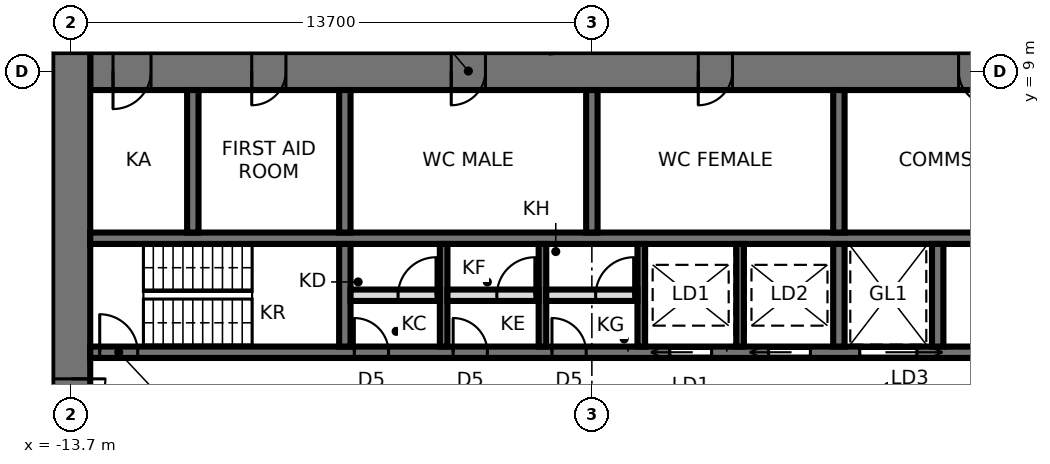
"""IFC4 building model, lengths in metres.
Left out: names, types, materials, properties, quantities, classifications, styles, units other than length and angle.
Written with IfcOpenShell. Run it as: python <this file> out.ifc"""

import sys

from ifc_helpers import new_model, si_unit, direction, frame, frame_2d, origin, place, context, subcontext, project, spatial, rectangle, extrude, element, fill, save


model = new_model("IFC4")
c1 = context("Model", 3, precision=1e-05, world=origin(), true_north=direction((0.0, 1.0)))
c2 = subcontext(c1, "Body", "Model", "MODEL_VIEW")
j1 = project(units=[si_unit("LENGTHUNIT", "METRE"), si_unit("PLANEANGLEUNIT", "RADIAN")], contexts=[c1])
p1 = place(None, origin())
s1 = spatial("IfcSite", under=j1, at=p1, CompositionType="ELEMENT")
p2 = place(p1, origin())
s2 = spatial("IfcBuilding", under=s1, at=p2, CompositionType="ELEMENT")
p3 = place(p2, frame((0.0, 0.0, 251.8)))
s3 = spatial("IfcBuildingStorey", under=s2, at=p3, CompositionType="ELEMENT", Elevation=251.8)
p4 = place(p3, frame((13.2, 9.0, 0.0), z_axis=(0.0, 0.0, 1.0), x_axis=(-1.0, 0.0, 0.0)))
e1 = element("IfcWall", 1, at=p4, inside=s3, PredefinedType="SHEAR", context=c2, shape_type="SweptSolid", body=[
    extrude(rectangle(XDim=26.4, YDim=1.0, at=frame_2d((13.2, 0.0))), origin(), (0.0, 0.0, 1.0), 4.2),
])
p5 = place(p4, frame((2.65, 0.0, 0.0)))
e2 = element("IfcOpeningElement", 2, at=p5, cuts=e1, PredefinedType="OPENING", context=c2, shape_type="SweptSolid", body=[
    extrude(rectangle(XDim=0.9, YDim=2.1, at=frame_2d((0.45, 1.05))), frame((0.0, 0.51, 0.0), z_axis=(0.0, -1.0, 0.0), x_axis=(1.0, 0.0, 0.0)), (0.0, 0.0, 1.0), 1.02),
])
p6 = place(p4, frame((9.5, 0.0, 0.0)))
e3 = element("IfcOpeningElement", 3, at=p6, cuts=e1, PredefinedType="OPENING", context=c2, shape_type="SweptSolid", body=[
    extrude(rectangle(XDim=0.9, YDim=2.1, at=frame_2d((0.45, 1.05))), frame((0.0, 0.51, 0.0), z_axis=(0.0, -1.0, 0.0), x_axis=(1.0, 0.0, 0.0)), (0.0, 0.0, 1.0), 1.02),
])
p7 = place(p4, frame((16.0, 0.0, 0.0)))
e4 = element("IfcOpeningElement", 4, at=p7, cuts=e1, PredefinedType="OPENING", context=c2, shape_type="SweptSolid", body=[
    extrude(rectangle(XDim=0.9, YDim=2.1, at=frame_2d((0.45, 1.05))), frame((0.0, 0.51, 0.0), z_axis=(0.0, -1.0, 0.0), x_axis=(1.0, 0.0, 0.0)), (0.0, 0.0, 1.0), 1.02),
])
p8 = place(p4, frame((21.25, 0.0, 0.0)))
e5 = element("IfcOpeningElement", 5, at=p8, cuts=e1, PredefinedType="OPENING", context=c2, shape_type="SweptSolid", body=[
    extrude(rectangle(XDim=0.9, YDim=2.1, at=frame_2d((0.45, 1.05))), frame((0.0, 0.51, 0.0), z_axis=(0.0, -1.0, 0.0), x_axis=(1.0, 0.0, 0.0)), (0.0, 0.0, 1.0), 1.02),
])
p9 = place(p4, frame((24.8, 0.0, 0.0)))
e6 = element("IfcOpeningElement", 6, at=p9, cuts=e1, PredefinedType="OPENING", context=c2, shape_type="SweptSolid", body=[
    extrude(rectangle(XDim=1.0, YDim=2.1, at=frame_2d((0.5, 1.05))), frame((0.0, 0.51, 0.0), z_axis=(0.0, -1.0, 0.0), x_axis=(1.0, 0.0, 0.0)), (0.0, 0.0, 1.0), 1.02),
])
p10 = place(p3, frame((-13.7, 9.5, 0.0), z_axis=(0.0, 0.0, 1.0), x_axis=(0.0, -1.0, 0.0)))
e7 = element("IfcWall", 7, at=p10, inside=s3, PredefinedType="SHEAR", context=c2, shape_type="SweptSolid", body=[
    extrude(rectangle(XDim=19.0, YDim=1.0, at=frame_2d((9.5, 0.0))), origin(), (0.0, 0.0, 1.0), 4.2),
])
p11 = place(p10, frame((8.6, 0.0, 0.0)))
e8 = element("IfcOpeningElement", 8, at=p11, cuts=e7, PredefinedType="OPENING", context=c2, shape_type="SweptSolid", body=[
    extrude(rectangle(XDim=1.8, YDim=2.4, at=frame_2d((0.9, 1.2))), frame((0.0, 0.51, 0.0), z_axis=(0.0, -1.0, 0.0), x_axis=(1.0, 0.0, 0.0)), (0.0, 0.0, 1.0), 1.02),
])
p12 = place(p3, frame((-13.2, 1.6, 0.0), z_axis=(0.0, 0.0, 1.0), x_axis=(1.0, 0.0, 0.0)))
e9 = element("IfcWall", 9, at=p12, inside=s3, PredefinedType="SHEAR", context=c2, shape_type="SweptSolid", body=[
    extrude(rectangle(XDim=26.4, YDim=0.3, at=frame_2d((13.2, 0.0))), origin(), (0.0, 0.0, 1.0), 4.2),
])
p13 = place(p12, frame((0.25, 0.0, 0.0)))
e10 = element("IfcOpeningElement", 10, at=p13, cuts=e9, PredefinedType="OPENING", context=c2, shape_type="SweptSolid", body=[
    extrude(rectangle(XDim=1.0, YDim=2.1, at=frame_2d((0.5, 1.05))), frame((0.0, 0.16, 0.0), z_axis=(0.0, -1.0, 0.0), x_axis=(1.0, 0.0, 0.0)), (0.0, 0.0, 1.0), 0.32),
])
p14 = place(p12, frame((20.25, 0.0, 0.0)))
e11 = element("IfcOpeningElement", 11, at=p14, cuts=e9, PredefinedType="OPENING", context=c2, shape_type="SweptSolid", body=[
    extrude(rectangle(XDim=1.5, YDim=2.4, at=frame_2d((0.75, 1.2))), frame((0.0, 0.16, 0.0), z_axis=(0.0, -1.0, 0.0), x_axis=(1.0, 0.0, 0.0)), (0.0, 0.0, 1.0), 0.32),
])
p15 = place(p12, frame((6.95, 0.0, 0.0)))
e12 = element("IfcOpeningElement", 12, at=p15, cuts=e9, PredefinedType="OPENING", context=c2, shape_type="SweptSolid", body=[
    extrude(rectangle(XDim=0.9, YDim=2.1, at=frame_2d((0.45, 1.05))), frame((0.0, 0.16, 0.0), z_axis=(0.0, -1.0, 0.0), x_axis=(1.0, 0.0, 0.0)), (0.0, 0.0, 1.0), 0.32),
])
p16 = place(p12, frame((9.55, 0.0, 0.0)))
e13 = element("IfcOpeningElement", 13, at=p16, cuts=e9, PredefinedType="OPENING", context=c2, shape_type="SweptSolid", body=[
    extrude(rectangle(XDim=0.9, YDim=2.1, at=frame_2d((0.45, 1.05))), frame((0.0, 0.16, 0.0), z_axis=(0.0, -1.0, 0.0), x_axis=(1.0, 0.0, 0.0)), (0.0, 0.0, 1.0), 0.32),
])
p17 = place(p12, frame((12.15, 0.0, 0.0)))
e14 = element("IfcOpeningElement", 14, at=p17, cuts=e9, PredefinedType="OPENING", context=c2, shape_type="SweptSolid", body=[
    extrude(rectangle(XDim=0.9, YDim=2.1, at=frame_2d((0.45, 1.05))), frame((0.0, 0.16, 0.0), z_axis=(0.0, -1.0, 0.0), x_axis=(1.0, 0.0, 0.0)), (0.0, 0.0, 1.0), 0.32),
])
p18 = place(p12, frame((15.25, 0.0, 0.0)))
e15 = element("IfcOpeningElement", 15, at=p18, cuts=e9, PredefinedType="OPENING", context=c2, shape_type="SweptSolid", body=[
    extrude(rectangle(XDim=1.1, YDim=2.3, at=frame_2d((0.55, 1.15))), frame((0.0, 0.16, 0.0), z_axis=(0.0, -1.0, 0.0), x_axis=(1.0, 0.0, 0.0)), (0.0, 0.0, 1.0), 0.32),
])
p19 = place(p12, frame((17.85, 0.0, 0.0)))
e16 = element("IfcOpeningElement", 16, at=p19, cuts=e9, PredefinedType="OPENING", context=c2, shape_type="SweptSolid", body=[
    extrude(rectangle(XDim=1.1, YDim=2.3, at=frame_2d((0.55, 1.15))), frame((0.0, 0.16, 0.0), z_axis=(0.0, -1.0, 0.0), x_axis=(1.0, 0.0, 0.0)), (0.0, 0.0, 1.0), 0.32),
])
p20 = place(p12, frame((24.15, 0.0, 0.0)))
e17 = element("IfcOpeningElement", 17, at=p20, cuts=e9, PredefinedType="OPENING", context=c2, shape_type="SweptSolid", body=[
    extrude(rectangle(XDim=0.9, YDim=2.1, at=frame_2d((0.45, 1.05))), frame((0.0, 0.16, 0.0), z_axis=(0.0, -1.0, 0.0), x_axis=(1.0, 0.0, 0.0)), (0.0, 0.0, 1.0), 0.32),
])
p21 = place(p3, frame((-13.2, 4.6, 0.0), z_axis=(0.0, 0.0, 1.0), x_axis=(1.0, 0.0, 0.0)))
e18 = element("IfcWall", 18, at=p21, inside=s3, PredefinedType="SHEAR", context=c2, shape_type="SweptSolid", body=[
    extrude(rectangle(XDim=26.4, YDim=0.3, at=frame_2d((13.2, 0.0))), origin(), (0.0, 0.0, 1.0), 4.2),
])
p22 = place(p3, frame((-6.5, 1.75, 0.0), z_axis=(0.0, 0.0, 1.0), x_axis=(0.0, 1.0, 0.0)))
e19 = element("IfcWall", 19, at=p22, inside=s3, PredefinedType="SHEAR", context=c2, shape_type="SweptSolid", body=[
    extrude(rectangle(XDim=2.7, YDim=0.3, at=frame_2d((1.35, 0.0))), origin(), (0.0, 0.0, 1.0), 4.2),
])
p23 = place(p3, frame((-6.5, 4.75, 0.0), z_axis=(0.0, 0.0, 1.0), x_axis=(0.0, 1.0, 0.0)))
e20 = element("IfcWall", 20, at=p23, inside=s3, PredefinedType="SHEAR", context=c2, shape_type="SweptSolid", body=[
    extrude(rectangle(XDim=3.75, YDim=0.3, at=frame_2d((1.875, 0.0))), origin(), (0.0, 0.0, 1.0), 4.2),
])
p24 = place(p3, frame((6.5, 1.75, 0.0), z_axis=(0.0, 0.0, 1.0), x_axis=(0.0, 1.0, 0.0)))
e21 = element("IfcWall", 21, at=p24, inside=s3, PredefinedType="SHEAR", context=c2, shape_type="SweptSolid", body=[
    extrude(rectangle(XDim=2.7, YDim=0.3, at=frame_2d((1.35, 0.0))), origin(), (0.0, 0.0, 1.0), 4.2),
])
p25 = place(p3, frame((6.5, 4.75, 0.0), z_axis=(0.0, 0.0, 1.0), x_axis=(0.0, 1.0, 0.0)))
e22 = element("IfcWall", 22, at=p25, inside=s3, PredefinedType="SHEAR", context=c2, shape_type="SweptSolid", body=[
    extrude(rectangle(XDim=3.75, YDim=0.3, at=frame_2d((1.875, 0.0))), origin(), (0.0, 0.0, 1.0), 4.2),
])
for number, where, z_axis, x_axis in (
    (23, (-3.9, 1.75, 0.0), (0.0, 0.0, 1.0), (0.0, 1.0, 0.0)),
    (24, (-1.3, 1.75, 0.0), (0.0, 0.0, 1.0), (0.0, 1.0, 0.0)),
    (25, (1.3, 1.75, 0.0), (0.0, 0.0, 1.0), (0.0, 1.0, 0.0)),
    (26, (3.9, 1.75, 0.0), (0.0, 0.0, 1.0), (0.0, 1.0, 0.0)),
):
    element("IfcWall", number, at=place(p3, frame(where, z_axis=z_axis, x_axis=x_axis)), inside=s3, PredefinedType="SHEAR", context=c2, shape_type="SweptSolid", body=[
        extrude(rectangle(XDim=2.7, YDim=0.2, at=frame_2d((1.35, 0.0))), origin(), (0.0, 0.0, 1.0), 4.2),
    ])
for number, where, z_axis, x_axis in (
    (27, (0.0, 4.75, 0.0), (0.0, 0.0, 1.0), (0.0, 1.0, 0.0)),
    (28, (-10.5, 4.75, 0.0), (0.0, 0.0, 1.0), (0.0, 1.0, 0.0)),
):
    element("IfcWall", number, at=place(p3, frame(where, z_axis=z_axis, x_axis=x_axis)), inside=s3, PredefinedType="SHEAR", context=c2, shape_type="SweptSolid", body=[
        extrude(rectangle(XDim=3.75, YDim=0.3, at=frame_2d((1.875, 0.0))), origin(), (0.0, 0.0, 1.0), 4.2),
    ])
p26 = place(p3, frame((9.1, 1.75, 0.0), z_axis=(0.0, 0.0, 1.0), x_axis=(0.0, 1.0, 0.0)))
e29 = element("IfcWall", 29, at=p26, inside=s3, PredefinedType="SHEAR", context=c2, shape_type="SweptSolid", body=[
    extrude(rectangle(XDim=2.7, YDim=0.3, at=frame_2d((1.35, 0.0))), origin(), (0.0, 0.0, 1.0), 4.2),
])
p27 = place(p3, frame((-6.35, 3.1, 0.0), z_axis=(0.0, 0.0, 1.0), x_axis=(1.0, 0.0, 0.0)))
e30 = element("IfcWall", 30, at=p27, inside=s3, PredefinedType="PARTITIONING", context=c2, shape_type="SweptSolid", body=[
    extrude(rectangle(XDim=2.35, YDim=0.3, at=frame_2d((1.175, 0.0))), origin(), (0.0, 0.0, 1.0), 4.04),
])
p28 = place(p27, frame((1.25, 0.0, 0.0)))
e31 = element("IfcOpeningElement", 31, at=p28, cuts=e30, PredefinedType="OPENING", context=c2, shape_type="SweptSolid", body=[
    extrude(rectangle(XDim=1.0, YDim=2.4, at=frame_2d((0.5, 1.2))), frame((0.0, 0.16, 0.0), z_axis=(0.0, -1.0, 0.0), x_axis=(1.0, 0.0, 0.0)), (0.0, 0.0, 1.0), 0.32),
])
p29 = place(p3, frame((-3.8, 3.1, 0.0), z_axis=(0.0, 0.0, 1.0), x_axis=(1.0, 0.0, 0.0)))
e32 = element("IfcWall", 32, at=p29, inside=s3, PredefinedType="PARTITIONING", context=c2, shape_type="SweptSolid", body=[
    extrude(rectangle(XDim=2.4, YDim=0.3, at=frame_2d((1.2, 0.0))), origin(), (0.0, 0.0, 1.0), 4.04),
])
p30 = place(p29, frame((1.3, 0.0, 0.0)))
e33 = element("IfcOpeningElement", 33, at=p30, cuts=e32, PredefinedType="OPENING", context=c2, shape_type="SweptSolid", body=[
    extrude(rectangle(XDim=1.0, YDim=2.4, at=frame_2d((0.5, 1.2))), frame((0.0, 0.16, 0.0), z_axis=(0.0, -1.0, 0.0), x_axis=(1.0, 0.0, 0.0)), (0.0, 0.0, 1.0), 0.32),
])
p31 = place(p3, frame((-1.2, 3.1, 0.0), z_axis=(0.0, 0.0, 1.0), x_axis=(1.0, 0.0, 0.0)))
e34 = element("IfcWall", 34, at=p31, inside=s3, PredefinedType="PARTITIONING", context=c2, shape_type="SweptSolid", body=[
    extrude(rectangle(XDim=2.4, YDim=0.3, at=frame_2d((1.2, 0.0))), origin(), (0.0, 0.0, 1.0), 4.04),
])
p32 = place(p31, frame((1.3, 0.0, 0.0)))
e35 = element("IfcOpeningElement", 35, at=p32, cuts=e34, PredefinedType="OPENING", context=c2, shape_type="SweptSolid", body=[
    extrude(rectangle(XDim=1.0, YDim=2.4, at=frame_2d((0.5, 1.2))), frame((0.0, 0.16, 0.0), z_axis=(0.0, -1.0, 0.0), x_axis=(1.0, 0.0, 0.0)), (0.0, 0.0, 1.0), 0.32),
])
p33 = place(p3, frame((-0.999, 9.5, 0.0), z_axis=(0.0, 0.0, 1.0), x_axis=(-0.104537331683, 0.99452096322, 0.0)))
e36 = element("IfcWall", 36, at=p33, inside=s3, PredefinedType="PARTITIONING", context=c2, shape_type="SweptSolid", body=[
    extrude(rectangle(XDim=1.81, YDim=0.12, at=frame_2d((0.905, 0.0))), origin(), (0.0, 0.0, 1.0), 4.04),
])
p34 = place(p11, origin())
e37 = element("IfcDoor", 37, at=p34, inside=s3, OperationType="DOUBLE_DOOR_SINGLE_SWING", PredefinedType="DOOR", context=c2, shape_type="SweptSolid", body=[
    extrude(rectangle(XDim=1.72, YDim=2.36, at=frame_2d((0.9, 1.18))), frame((0.0, 0.025, 0.0), z_axis=(0.0, -1.0, 0.0), x_axis=(1.0, 0.0, 0.0)), (0.0, 0.0, 1.0), 0.05),
    extrude(rectangle(XDim=0.04, YDim=2.4, at=frame_2d((0.02, 1.2))), frame((0.0, 0.25, 0.0), z_axis=(0.0, -1.0, 0.0), x_axis=(1.0, 0.0, 0.0)), (0.0, 0.0, 1.0), 0.5),
    extrude(rectangle(XDim=0.04, YDim=2.4, at=frame_2d((1.78, 1.2))), frame((0.0, 0.25, 0.0), z_axis=(0.0, -1.0, 0.0), x_axis=(1.0, 0.0, 0.0)), (0.0, 0.0, 1.0), 0.5),
    extrude(rectangle(XDim=1.72, YDim=0.04, at=frame_2d((0.9, 2.38))), frame((0.0, 0.25, 0.0), z_axis=(0.0, -1.0, 0.0), x_axis=(1.0, 0.0, 0.0)), (0.0, 0.0, 1.0), 0.5),
])
fill(e8, e37)
p35 = place(p13, origin())
e38 = element("IfcDoor", 38, at=p35, inside=s3, OperationType="SINGLE_SWING_LEFT", PredefinedType="DOOR", context=c2, shape_type="SweptSolid", body=[
    extrude(rectangle(XDim=1.0, YDim=2.1, at=frame_2d((0.5, 1.05))), frame((0.0, 0.025, 0.0), z_axis=(0.0, -1.0, 0.0), x_axis=(1.0, 0.0, 0.0)), (0.0, 0.0, 1.0), 0.05),
])
fill(e10, e38)
p36 = place(p14, origin())
e39 = element("IfcDoor", 39, at=p36, inside=s3, OperationType="SLIDING_TO_RIGHT", PredefinedType="DOOR", context=c2, shape_type="SweptSolid", body=[
    extrude(rectangle(XDim=1.5, YDim=2.4, at=frame_2d((0.75, 1.2))), frame((0.0, 0.025, 0.0), z_axis=(0.0, -1.0, 0.0), x_axis=(1.0, 0.0, 0.0)), (0.0, 0.0, 1.0), 0.05),
])
fill(e11, e39)
p37 = place(p28, origin())
e40 = element("IfcDoor", 40, at=p37, inside=s3, OperationType="SINGLE_SWING_RIGHT", PredefinedType="DOOR", context=c2, shape_type="SweptSolid", body=[
    extrude(rectangle(XDim=1.0, YDim=2.4, at=frame_2d((0.5, 1.2))), frame((0.0, 0.025, 0.0), z_axis=(0.0, -1.0, 0.0), x_axis=(1.0, 0.0, 0.0)), (0.0, 0.0, 1.0), 0.05),
])
fill(e31, e40)
p38 = place(p15, origin())
e41 = element("IfcDoor", 41, at=p38, inside=s3, OperationType="SINGLE_SWING_LEFT", PredefinedType="DOOR", context=c2, shape_type="SweptSolid", body=[
    extrude(rectangle(XDim=0.9, YDim=2.1, at=frame_2d((0.45, 1.05))), frame((0.0, 0.025, 0.0), z_axis=(0.0, -1.0, 0.0), x_axis=(1.0, 0.0, 0.0)), (0.0, 0.0, 1.0), 0.05),
])
fill(e12, e41)
p39 = place(p30, origin())
e42 = element("IfcDoor", 42, at=p39, inside=s3, OperationType="SINGLE_SWING_RIGHT", PredefinedType="DOOR", context=c2, shape_type="SweptSolid", body=[
    extrude(rectangle(XDim=1.0, YDim=2.4, at=frame_2d((0.5, 1.2))), frame((0.0, 0.025, 0.0), z_axis=(0.0, -1.0, 0.0), x_axis=(1.0, 0.0, 0.0)), (0.0, 0.0, 1.0), 0.05),
])
fill(e33, e42)
p40 = place(p16, origin())
e43 = element("IfcDoor", 43, at=p40, inside=s3, OperationType="SINGLE_SWING_LEFT", PredefinedType="DOOR", context=c2, shape_type="SweptSolid", body=[
    extrude(rectangle(XDim=0.9, YDim=2.1, at=frame_2d((0.45, 1.05))), frame((0.0, 0.025, 0.0), z_axis=(0.0, -1.0, 0.0), x_axis=(1.0, 0.0, 0.0)), (0.0, 0.0, 1.0), 0.05),
])
fill(e13, e43)
p41 = place(p32, origin())
e44 = element("IfcDoor", 44, at=p41, inside=s3, OperationType="SINGLE_SWING_RIGHT", PredefinedType="DOOR", context=c2, shape_type="SweptSolid", body=[
    extrude(rectangle(XDim=1.0, YDim=2.4, at=frame_2d((0.5, 1.2))), frame((0.0, 0.025, 0.0), z_axis=(0.0, -1.0, 0.0), x_axis=(1.0, 0.0, 0.0)), (0.0, 0.0, 1.0), 0.05),
])
fill(e35, e44)
p42 = place(p17, origin())
e45 = element("IfcDoor", 45, at=p42, inside=s3, OperationType="SINGLE_SWING_LEFT", PredefinedType="DOOR", context=c2, shape_type="SweptSolid", body=[
    extrude(rectangle(XDim=0.9, YDim=2.1, at=frame_2d((0.45, 1.05))), frame((0.0, 0.025, 0.0), z_axis=(0.0, -1.0, 0.0), x_axis=(1.0, 0.0, 0.0)), (0.0, 0.0, 1.0), 0.05),
])
fill(e14, e45)
p43 = place(p18, origin())
e46 = element("IfcDoor", 46, at=p43, inside=s3, OperationType="SLIDING_TO_LEFT", PredefinedType="DOOR", context=c2, shape_type="SweptSolid", body=[
    extrude(rectangle(XDim=1.1, YDim=2.3, at=frame_2d((0.55, 1.15))), frame((0.0, 0.025, 0.0), z_axis=(0.0, -1.0, 0.0), x_axis=(1.0, 0.0, 0.0)), (0.0, 0.0, 1.0), 0.05),
])
fill(e15, e46)
p44 = place(p19, origin())
e47 = element("IfcDoor", 47, at=p44, inside=s3, OperationType="SLIDING_TO_LEFT", PredefinedType="DOOR", context=c2, shape_type="SweptSolid", body=[
    extrude(rectangle(XDim=1.1, YDim=2.3, at=frame_2d((0.55, 1.15))), frame((0.0, 0.025, 0.0), z_axis=(0.0, -1.0, 0.0), x_axis=(1.0, 0.0, 0.0)), (0.0, 0.0, 1.0), 0.05),
])
fill(e16, e47)
p45 = place(p5, origin())
e48 = element("IfcDoor", 48, at=p45, inside=s3, OperationType="SINGLE_SWING_LEFT", PredefinedType="DOOR", context=c2, shape_type="SweptSolid", body=[
    extrude(rectangle(XDim=0.82, YDim=2.06, at=frame_2d((0.45, 1.03))), frame((0.0, 0.025, 0.0), z_axis=(0.0, -1.0, 0.0), x_axis=(1.0, 0.0, 0.0)), (0.0, 0.0, 1.0), 0.05),
    extrude(rectangle(XDim=0.04, YDim=2.1, at=frame_2d((0.02, 1.05))), frame((0.0, 0.25, 0.0), z_axis=(0.0, -1.0, 0.0), x_axis=(1.0, 0.0, 0.0)), (0.0, 0.0, 1.0), 0.5),
    extrude(rectangle(XDim=0.04, YDim=2.1, at=frame_2d((0.88, 1.05))), frame((0.0, 0.25, 0.0), z_axis=(0.0, -1.0, 0.0), x_axis=(1.0, 0.0, 0.0)), (0.0, 0.0, 1.0), 0.5),
    extrude(rectangle(XDim=0.82, YDim=0.04, at=frame_2d((0.45, 2.08))), frame((0.0, 0.25, 0.0), z_axis=(0.0, -1.0, 0.0), x_axis=(1.0, 0.0, 0.0)), (0.0, 0.0, 1.0), 0.5),
])
fill(e2, e48)
p46 = place(p6, origin())
e49 = element("IfcDoor", 49, at=p46, inside=s3, OperationType="SINGLE_SWING_RIGHT", PredefinedType="DOOR", context=c2, shape_type="SweptSolid", body=[
    extrude(rectangle(XDim=0.82, YDim=2.06, at=frame_2d((0.45, 1.03))), frame((0.0, 0.025, 0.0), z_axis=(0.0, -1.0, 0.0), x_axis=(1.0, 0.0, 0.0)), (0.0, 0.0, 1.0), 0.05),
    extrude(rectangle(XDim=0.04, YDim=2.1, at=frame_2d((0.02, 1.05))), frame((0.0, 0.25, 0.0), z_axis=(0.0, -1.0, 0.0), x_axis=(1.0, 0.0, 0.0)), (0.0, 0.0, 1.0), 0.5),
    extrude(rectangle(XDim=0.04, YDim=2.1, at=frame_2d((0.88, 1.05))), frame((0.0, 0.25, 0.0), z_axis=(0.0, -1.0, 0.0), x_axis=(1.0, 0.0, 0.0)), (0.0, 0.0, 1.0), 0.5),
    extrude(rectangle(XDim=0.82, YDim=0.04, at=frame_2d((0.45, 2.08))), frame((0.0, 0.25, 0.0), z_axis=(0.0, -1.0, 0.0), x_axis=(1.0, 0.0, 0.0)), (0.0, 0.0, 1.0), 0.5),
])
fill(e3, e49)
p47 = place(p7, origin())
e50 = element("IfcDoor", 50, at=p47, inside=s3, OperationType="SINGLE_SWING_RIGHT", PredefinedType="DOOR", context=c2, shape_type="SweptSolid", body=[
    extrude(rectangle(XDim=0.82, YDim=2.06, at=frame_2d((0.45, 1.03))), frame((0.0, 0.025, 0.0), z_axis=(0.0, -1.0, 0.0), x_axis=(1.0, 0.0, 0.0)), (0.0, 0.0, 1.0), 0.05),
    extrude(rectangle(XDim=0.04, YDim=2.1, at=frame_2d((0.02, 1.05))), frame((0.0, 0.25, 0.0), z_axis=(0.0, -1.0, 0.0), x_axis=(1.0, 0.0, 0.0)), (0.0, 0.0, 1.0), 0.5),
    extrude(rectangle(XDim=0.04, YDim=2.1, at=frame_2d((0.88, 1.05))), frame((0.0, 0.25, 0.0), z_axis=(0.0, -1.0, 0.0), x_axis=(1.0, 0.0, 0.0)), (0.0, 0.0, 1.0), 0.5),
    extrude(rectangle(XDim=0.82, YDim=0.04, at=frame_2d((0.45, 2.08))), frame((0.0, 0.25, 0.0), z_axis=(0.0, -1.0, 0.0), x_axis=(1.0, 0.0, 0.0)), (0.0, 0.0, 1.0), 0.5),
])
fill(e4, e50)
p48 = place(p8, origin())
e51 = element("IfcDoor", 51, at=p48, inside=s3, OperationType="SINGLE_SWING_RIGHT", PredefinedType="DOOR", context=c2, shape_type="SweptSolid", body=[
    extrude(rectangle(XDim=0.82, YDim=2.06, at=frame_2d((0.45, 1.03))), frame((0.0, 0.025, 0.0), z_axis=(0.0, -1.0, 0.0), x_axis=(1.0, 0.0, 0.0)), (0.0, 0.0, 1.0), 0.05),
    extrude(rectangle(XDim=0.04, YDim=2.1, at=frame_2d((0.02, 1.05))), frame((0.0, 0.25, 0.0), z_axis=(0.0, -1.0, 0.0), x_axis=(1.0, 0.0, 0.0)), (0.0, 0.0, 1.0), 0.5),
    extrude(rectangle(XDim=0.04, YDim=2.1, at=frame_2d((0.88, 1.05))), frame((0.0, 0.25, 0.0), z_axis=(0.0, -1.0, 0.0), x_axis=(1.0, 0.0, 0.0)), (0.0, 0.0, 1.0), 0.5),
    extrude(rectangle(XDim=0.82, YDim=0.04, at=frame_2d((0.45, 2.08))), frame((0.0, 0.25, 0.0), z_axis=(0.0, -1.0, 0.0), x_axis=(1.0, 0.0, 0.0)), (0.0, 0.0, 1.0), 0.5),
])
fill(e5, e51)
p49 = place(p9, origin())
e52 = element("IfcDoor", 52, at=p49, inside=s3, OperationType="SINGLE_SWING_RIGHT", PredefinedType="DOOR", context=c2, shape_type="SweptSolid", body=[
    extrude(rectangle(XDim=0.92, YDim=2.06, at=frame_2d((0.5, 1.03))), frame((0.0, 0.025, 0.0), z_axis=(0.0, -1.0, 0.0), x_axis=(1.0, 0.0, 0.0)), (0.0, 0.0, 1.0), 0.05),
    extrude(rectangle(XDim=0.04, YDim=2.1, at=frame_2d((0.02, 1.05))), frame((0.0, 0.25, 0.0), z_axis=(0.0, -1.0, 0.0), x_axis=(1.0, 0.0, 0.0)), (0.0, 0.0, 1.0), 0.5),
    extrude(rectangle(XDim=0.04, YDim=2.1, at=frame_2d((0.98, 1.05))), frame((0.0, 0.25, 0.0), z_axis=(0.0, -1.0, 0.0), x_axis=(1.0, 0.0, 0.0)), (0.0, 0.0, 1.0), 0.5),
    extrude(rectangle(XDim=0.92, YDim=0.04, at=frame_2d((0.5, 2.08))), frame((0.0, 0.25, 0.0), z_axis=(0.0, -1.0, 0.0), x_axis=(1.0, 0.0, 0.0)), (0.0, 0.0, 1.0), 0.5),
])
fill(e6, e52)
save(model, sys.argv[1])
